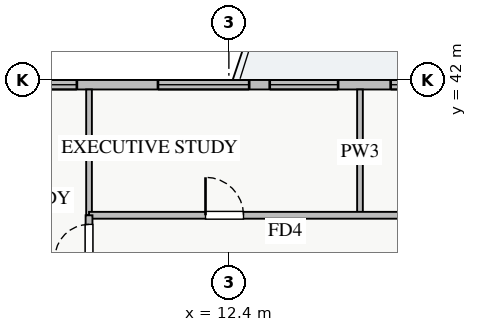
"""IFC4 building model, lengths in metres.
Left out: names, types, materials, properties, quantities, classifications, styles, units other than length and angle.
Written with IfcOpenShell. Run it as: python <this file> out.ifc"""

import sys

from ifc_helpers import new_model, si_unit, direction, frame, frame_2d, origin, place, context, subcontext, project, spatial, rectangle, extrude, source, transform, mapped, element, fill, save


model = new_model("IFC4")
c1 = context("Model", 3, precision=1e-05, world=origin(), true_north=direction((0.0, 1.0)))
c2 = subcontext(c1, "Body", "Model", "MODEL_VIEW")
j1 = project(units=[si_unit("LENGTHUNIT", "METRE"), si_unit("PLANEANGLEUNIT", "RADIAN")], contexts=[c1])
p1 = place(None, origin())
s1 = spatial("IfcSite", under=j1, at=p1, CompositionType="ELEMENT")
p2 = place(p1, origin())
s2 = spatial("IfcBuilding", under=s1, at=p2, CompositionType="ELEMENT")
p3 = place(p2, frame((0.0, 0.0, 89.25)))
s3 = spatial("IfcBuildingStorey", under=s2, at=p3, CompositionType="ELEMENT", Elevation=89.25)
p4 = place(p3, frame((5.45, 41.875, 0.0), z_axis=(0.0, 0.0, 1.0), x_axis=(1.0, 0.0, 0.0)))
e1 = element("IfcWall", 1, at=p4, inside=s3, PredefinedType="STANDARD", context=c2, shape_type="SweptSolid", body=[
    extrude(rectangle(XDim=27.1, YDim=0.25, at=frame_2d((13.55, 0.0))), origin(), (0.0, 0.0, 1.0), 2.57),
])
p5 = place(p4, frame((14.4, 0.0, 0.0)))
e2 = element("IfcOpeningElement", 2, at=p5, cuts=e1, PredefinedType="OPENING", context=c2, shape_type="SweptSolid", body=[
    extrude(rectangle(XDim=1.2, YDim=2.1, at=frame_2d((0.6, 1.05))), frame((0.0, 0.135, 0.0), z_axis=(0.0, -1.0, 0.0), x_axis=(1.0, 0.0, 0.0)), (0.0, 0.0, 1.0), 0.27),
])
p6 = place(p4, frame((1.45, 0.0, 0.9)))
e3 = element("IfcOpeningElement", 3, at=p6, cuts=e1, PredefinedType="OPENING", context=c2, shape_type="SweptSolid", body=[
    extrude(rectangle(XDim=1.5, YDim=1.5, at=frame_2d((0.75, 0.75))), frame((0.0, 0.135, 0.0), z_axis=(0.0, -1.0, 0.0), x_axis=(1.0, 0.0, 0.0)), (0.0, 0.0, 1.0), 0.27),
])
p7 = place(p4, frame((8.024, 0.0, 0.9)))
e4 = element("IfcOpeningElement", 4, at=p7, cuts=e1, PredefinedType="OPENING", context=c2, shape_type="SweptSolid", body=[
    extrude(rectangle(XDim=1.8, YDim=1.5, at=frame_2d((0.9, 0.75))), frame((0.0, 0.135, 0.0), z_axis=(0.0, -1.0, 0.0), x_axis=(1.0, 0.0, 0.0)), (0.0, 0.0, 1.0), 0.27),
])
p8 = place(p4, frame((16.188, 0.0, 0.9)))
e5 = element("IfcOpeningElement", 5, at=p8, cuts=e1, PredefinedType="OPENING", context=c2, shape_type="SweptSolid", body=[
    extrude(rectangle(XDim=1.5, YDim=1.45, at=frame_2d((0.75, 0.725))), frame((0.0, 0.135, 0.0), z_axis=(0.0, -1.0, 0.0), x_axis=(1.0, 0.0, 0.0)), (0.0, 0.0, 1.0), 0.27),
])
p9 = place(p4, frame((22.663, 0.0, 0.9)))
e6 = element("IfcOpeningElement", 6, at=p9, cuts=e1, PredefinedType="OPENING", context=c2, shape_type="SweptSolid", body=[
    extrude(rectangle(XDim=2.1, YDim=1.48, at=frame_2d((1.05, 0.74))), frame((0.0, 0.135, 0.0), z_axis=(0.0, -1.0, 0.0), x_axis=(1.0, 0.0, 0.0)), (0.0, 0.0, 1.0), 0.27),
])
p10 = place(p4, frame((5.084, 0.0, 0.9)))
e7 = element("IfcOpeningElement", 7, at=p10, cuts=e1, PredefinedType="OPENING", context=c2, shape_type="SweptSolid", body=[
    extrude(rectangle(XDim=2.4, YDim=1.5, at=frame_2d((1.2, 0.75))), frame((0.0, 0.135, 0.0), z_axis=(0.0, -1.0, 0.0), x_axis=(1.0, 0.0, 0.0)), (0.0, 0.0, 1.0), 0.27),
])
p11 = place(p4, frame((11.208, 0.0, 0.9)))
e8 = element("IfcOpeningElement", 8, at=p11, cuts=e1, PredefinedType="OPENING", context=c2, shape_type="SweptSolid", body=[
    extrude(rectangle(XDim=2.4, YDim=1.5, at=frame_2d((1.2, 0.75))), frame((0.0, 0.135, 0.0), z_axis=(0.0, -1.0, 0.0), x_axis=(1.0, 0.0, 0.0)), (0.0, 0.0, 1.0), 0.27),
])
p12 = place(p3, frame((15.85, 38.44, 0.0), z_axis=(0.0, 0.0, 1.0), x_axis=(0.0, 1.0, 0.0)))
e9 = element("IfcWall", 9, at=p12, inside=s3, PredefinedType="PARTITIONING", context=c2, shape_type="SweptSolid", body=[
    extrude(rectangle(XDim=3.31, YDim=0.15, at=frame_2d((1.655, 0.0))), origin(), (0.0, 0.0, 1.0), 2.725),
])
p13 = place(p3, frame((8.72, 38.44, 0.0), z_axis=(0.0, 0.0, 1.0), x_axis=(0.0, 1.0, 0.0)))
e10 = element("IfcWall", 10, at=p13, inside=s3, PredefinedType="PARTITIONING", context=c2, shape_type="SweptSolid", body=[
    extrude(rectangle(XDim=3.31, YDim=0.15, at=frame_2d((1.655, 0.0))), origin(), (0.0, 0.0, 1.0), 3.03),
])
p14 = place(p3, frame((8.72, 38.44, 0.0), z_axis=(0.0, 0.0, 1.0), x_axis=(1.0, 0.0, 0.0)))
e11 = element("IfcWall", 11, at=p14, inside=s3, PredefinedType="PARTITIONING", context=c2, shape_type="SweptSolid", body=[
    extrude(rectangle(XDim=23.63, YDim=0.18, at=frame_2d((11.815, 0.0))), origin(), (0.0, 0.0, 1.0), 3.03),
])
p15 = place(p14, frame((3.065, 0.0, 0.0)))
e12 = element("IfcOpeningElement", 12, at=p15, cuts=e11, PredefinedType="OPENING", context=c2, shape_type="SweptSolid", body=[
    extrude(rectangle(XDim=1.0, YDim=2.05, at=frame_2d((0.5, 1.025))), frame((0.0, 0.1, 0.0), z_axis=(0.0, -1.0, 0.0), x_axis=(1.0, 0.0, 0.0)), (0.0, 0.0, 1.0), 0.2),
])
p16 = place(p14, frame((10.94, 0.0, 0.0)))
e13 = element("IfcOpeningElement", 13, at=p16, cuts=e11, PredefinedType="OPENING", context=c2, shape_type="SweptSolid", body=[
    extrude(rectangle(XDim=1.0, YDim=2.05, at=frame_2d((0.5, 1.025))), frame((0.0, 0.1, 0.0), z_axis=(0.0, -1.0, 0.0), x_axis=(1.0, 0.0, 0.0)), (0.0, 0.0, 1.0), 0.2),
])
p17 = place(p14, frame((19.19, 0.0, 0.0)))
e14 = element("IfcOpeningElement", 14, at=p17, cuts=e11, PredefinedType="OPENING", context=c2, shape_type="SweptSolid", body=[
    extrude(rectangle(XDim=1.0, YDim=2.05, at=frame_2d((0.5, 1.025))), frame((0.0, 0.1, 0.0), z_axis=(0.0, -1.0, 0.0), x_axis=(1.0, 0.0, 0.0)), (0.0, 0.0, 1.0), 0.2),
])
p18 = place(p3, frame((8.72, 7.21, 0.0), z_axis=(0.0, 0.0, 1.0), x_axis=(0.0, 1.0, 0.0)))
e15 = element("IfcWall", 15, at=p18, inside=s3, PredefinedType="PARTITIONING", context=c2, shape_type="SweptSolid", body=[
    extrude(rectangle(XDim=31.23, YDim=0.18, at=frame_2d((15.615, 0.0))), origin(), (0.0, 0.0, 1.0), 3.03),
])
p19 = place(p18, frame((30.09, 0.0, 0.0)))
e16 = element("IfcOpeningElement", 16, at=p19, cuts=e15, PredefinedType="OPENING", context=c2, shape_type="SweptSolid", body=[
    extrude(rectangle(XDim=0.9, YDim=2.05, at=frame_2d((0.45, 1.025))), frame((0.0, 0.1, 0.0), z_axis=(0.0, -1.0, 0.0), x_axis=(1.0, 0.0, 0.0)), (0.0, 0.0, 1.0), 0.2),
])
p20 = place(p18, frame((0.24, 0.0, 0.0)))
e17 = element("IfcOpeningElement", 17, at=p20, cuts=e15, PredefinedType="OPENING", context=c2, shape_type="SweptSolid", body=[
    extrude(rectangle(XDim=0.9, YDim=2.05, at=frame_2d((0.45, 1.025))), frame((0.0, 0.1, 0.0), z_axis=(0.0, -1.0, 0.0), x_axis=(1.0, 0.0, 0.0)), (0.0, 0.0, 1.0), 0.2),
])
p21 = place(p18, frame((3.07, 0.0, 0.0)))
e18 = element("IfcOpeningElement", 18, at=p21, cuts=e15, PredefinedType="OPENING", context=c2, shape_type="SweptSolid", body=[
    extrude(rectangle(XDim=1.0, YDim=2.05, at=frame_2d((0.5, 1.025))), frame((0.0, 0.1, 0.0), z_axis=(0.0, -1.0, 0.0), x_axis=(1.0, 0.0, 0.0)), (0.0, 0.0, 1.0), 0.2),
])
p22 = place(p18, frame((15.37, 0.0, 0.0)))
e19 = element("IfcOpeningElement", 19, at=p22, cuts=e15, PredefinedType="OPENING", context=c2, shape_type="SweptSolid", body=[
    extrude(rectangle(XDim=1.0, YDim=2.05, at=frame_2d((0.5, 1.025))), frame((0.0, 0.1, 0.0), z_axis=(0.0, -1.0, 0.0), x_axis=(1.0, 0.0, 0.0)), (0.0, 0.0, 1.0), 0.2),
])
p23 = place(p18, frame((21.96, 0.0, 0.0)))
e20 = element("IfcOpeningElement", 20, at=p23, cuts=e15, PredefinedType="OPENING", context=c2, shape_type="SweptSolid", body=[
    extrude(rectangle(XDim=1.0, YDim=2.05, at=frame_2d((0.5, 1.025))), frame((0.0, 0.1, 0.0), z_axis=(0.0, -1.0, 0.0), x_axis=(1.0, 0.0, 0.0)), (0.0, 0.0, 1.0), 0.2),
])
m1 = source(origin(), c2, "Body", "SweptSolid", [
    extrude(rectangle(XDim=1.5, YDim=1.5, at=frame_2d((0.75, 0.75))), frame((0.0, 0.03, 0.0), z_axis=(0.0, -1.0, 0.0), x_axis=(1.0, 0.0, 0.0)), (0.0, 0.0, 1.0), 0.06),
])
p24 = place(p6, origin())
e21 = element("IfcWindow", 21, at=p24, inside=s3, PartitioningType="TRIPLE_PANEL_VERTICAL", PredefinedType="WINDOW", context=c2, shape_type="MappedRepresentation", body=[
    mapped(m1, transform((0.0, 0.0, 0.0), x_axis=(1.0, 0.0, 0.0), y_axis=(0.0, 1.0, 0.0), z_axis=(0.0, 0.0, 1.0), scale=1.0)),
])
fill(e3, e21)
m2 = source(origin(), c2, "Body", "SweptSolid", [
    extrude(rectangle(XDim=1.8, YDim=1.5, at=frame_2d((0.9, 0.75))), frame((0.0, 0.03, 0.0), z_axis=(0.0, -1.0, 0.0), x_axis=(1.0, 0.0, 0.0)), (0.0, 0.0, 1.0), 0.06),
])
p25 = place(p7, origin())
e22 = element("IfcWindow", 22, at=p25, inside=s3, PartitioningType="DOUBLE_PANEL_VERTICAL", PredefinedType="WINDOW", context=c2, shape_type="MappedRepresentation", body=[
    mapped(m2, transform((0.0, 0.0, 0.0), x_axis=(1.0, 0.0, 0.0), y_axis=(0.0, 1.0, 0.0), z_axis=(0.0, 0.0, 1.0), scale=1.0)),
])
fill(e4, e22)
m3 = source(origin(), c2, "Body", "SweptSolid", [
    extrude(rectangle(XDim=1.0, YDim=2.05, at=frame_2d((0.5, 1.025))), frame((0.0, 0.025, 0.0), z_axis=(0.0, -1.0, 0.0), x_axis=(1.0, 0.0, 0.0)), (0.0, 0.0, 1.0), 0.05),
])
p26 = place(p15, origin())
e23 = element("IfcDoor", 23, at=p26, inside=s3, OperationType="SINGLE_SWING_LEFT", PredefinedType="DOOR", context=c2, shape_type="MappedRepresentation", body=[
    mapped(m3, transform((0.0, 0.0, 0.0), x_axis=(1.0, 0.0, 0.0), y_axis=(0.0, 1.0, 0.0), z_axis=(0.0, 0.0, 1.0), scale=1.0)),
])
fill(e12, e23)
m4 = source(origin(), c2, "Body", "SweptSolid", [
    extrude(rectangle(XDim=0.9, YDim=2.05, at=frame_2d((0.45, 1.025))), frame((0.0, 0.025, 0.0), z_axis=(0.0, -1.0, 0.0), x_axis=(1.0, 0.0, 0.0)), (0.0, 0.0, 1.0), 0.05),
])
p27 = place(p19, origin())
e24 = element("IfcDoor", 24, at=p27, inside=s3, OperationType="SINGLE_SWING_LEFT", PredefinedType="DOOR", context=c2, shape_type="MappedRepresentation", body=[
    mapped(m4, transform((0.0, 0.0, 0.0), x_axis=(1.0, 0.0, 0.0), y_axis=(0.0, 1.0, 0.0), z_axis=(0.0, 0.0, 1.0), scale=1.0)),
])
fill(e16, e24)
m5 = source(origin(), c2, "Body", "SweptSolid", [
    extrude(rectangle(XDim=2.4, YDim=1.5, at=frame_2d((1.2, 0.75))), frame((0.0, 0.03, 0.0), z_axis=(0.0, -1.0, 0.0), x_axis=(1.0, 0.0, 0.0)), (0.0, 0.0, 1.0), 0.06),
])
p28 = place(p10, origin())
e25 = element("IfcWindow", 25, at=p28, inside=s3, PartitioningType="TRIPLE_PANEL_VERTICAL", PredefinedType="WINDOW", context=c2, shape_type="MappedRepresentation", body=[
    mapped(m5, transform((0.0, 0.0, 0.0), x_axis=(1.0, 0.0, 0.0), y_axis=(0.0, 1.0, 0.0), z_axis=(0.0, 0.0, 1.0), scale=1.0)),
])
fill(e7, e25)
p29 = place(p11, origin())
e26 = element("IfcWindow", 26, at=p29, inside=s3, PartitioningType="TRIPLE_PANEL_VERTICAL", PredefinedType="WINDOW", context=c2, shape_type="MappedRepresentation", body=[
    mapped(m5, transform((0.0, 0.0, 0.0), x_axis=(1.0, 0.0, 0.0), y_axis=(0.0, 1.0, 0.0), z_axis=(0.0, 0.0, 1.0), scale=1.0)),
])
fill(e8, e26)
save(model, sys.argv[1])
